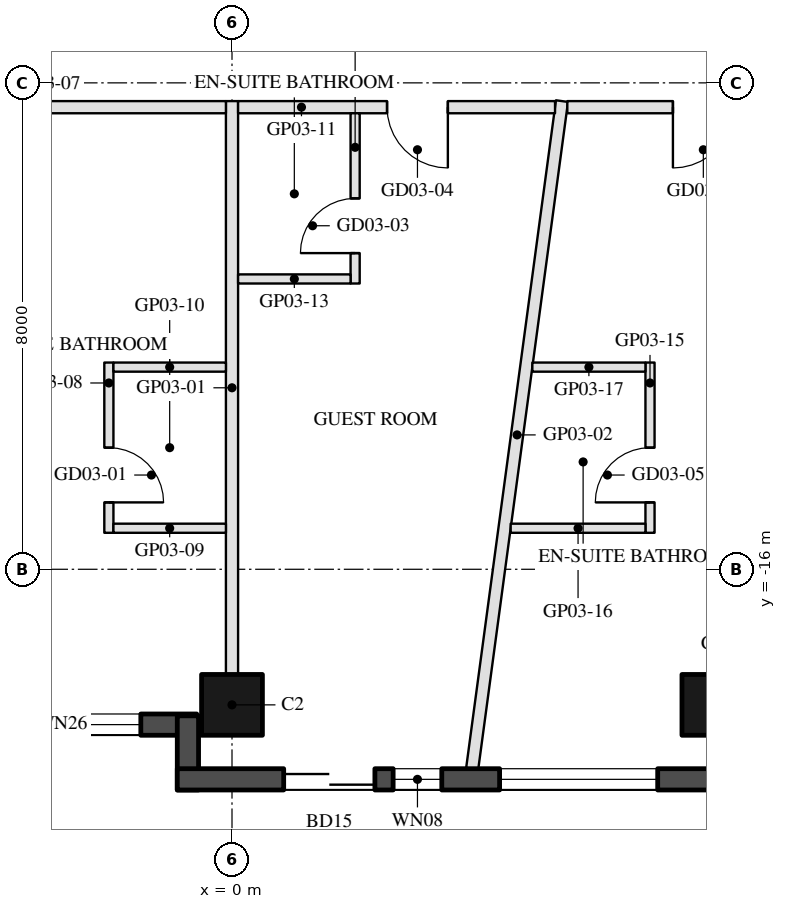
"""IFC4 building model, lengths in metres.
Left out: names, types, materials, properties, quantities, classifications, styles, units other than length and angle.
Written with IfcOpenShell. Run it as: python <this file> out.ifc"""

import sys

from ifc_helpers import new_model, si_unit, direction, frame, frame_2d, origin, origin_2d, place, context, subcontext, project, spatial, rectangle, hollow_rectangle, extrude, element, fill, save


model = new_model("IFC4")
c1 = context("Model", 3, precision=1e-05, world=origin(), true_north=direction((0.0, 1.0)))
c2 = subcontext(c1, "Body", "Model", "MODEL_VIEW")
j1 = project(units=[si_unit("LENGTHUNIT", "METRE"), si_unit("PLANEANGLEUNIT", "RADIAN")], contexts=[c1])
p1 = place(None, origin())
s1 = spatial("IfcSite", under=j1, at=p1, CompositionType="ELEMENT")
p2 = place(p1, origin())
s2 = spatial("IfcBuilding", under=s1, at=p2, CompositionType="ELEMENT")
p3 = place(p2, frame((0.0, 0.0, 61.3)))
s3 = spatial("IfcBuildingStorey", under=s2, at=p3, CompositionType="ELEMENT", Elevation=61.3)
for number, where, z_axis, x_axis in (
    (1, (0.0, -18.23, 0.0), (0.0, 0.0, 1.0), (-1.0, 0.0, 0.0)),
    (2, (7.9, -18.23, 0.0), (0.0, 0.0, 1.0), (-1.0, 0.0, 0.0)),
):
    element("IfcColumn", number, at=place(p3, frame(where, z_axis=z_axis, x_axis=x_axis)), inside=s3, PredefinedType="COLUMN", context=c2, shape_type="SweptSolid", body=[
        extrude(hollow_rectangle(XDim=1.0, YDim=1.0, WallThickness=0.045, at=origin_2d()), origin(), (0.0, 0.0, 1.0), 3.7),
    ])
p4 = place(p3, frame((-7.32, -18.555, 0.0), z_axis=(0.0, 0.0, 1.0), x_axis=(1.0, 0.0, 0.0)))
e3 = element("IfcWall", 3, at=p4, inside=s3, PredefinedType="SOLIDWALL", context=c2, shape_type="SweptSolid", body=[
    extrude(rectangle(XDim=6.74, YDim=0.35, at=frame_2d((3.37, 0.0))), origin(), (0.0, 0.0, 1.0), 3.55),
])
p5 = place(p4, frame((0.32, 0.0, 0.3)))
e4 = element("IfcOpeningElement", 4, at=p5, cuts=e3, PredefinedType="OPENING", context=c2, shape_type="SweptSolid", body=[
    extrude(rectangle(XDim=2.6, YDim=2.65, at=frame_2d((1.3, 1.325))), frame((0.0, 0.185, 0.0), z_axis=(0.0, -1.0, 0.0), x_axis=(1.0, 0.0, 0.0)), (0.0, 0.0, 1.0), 0.37),
])
p6 = place(p4, frame((3.22, 0.0, 0.3)))
e5 = element("IfcOpeningElement", 5, at=p6, cuts=e3, PredefinedType="OPENING", context=c2, shape_type="SweptSolid", body=[
    extrude(rectangle(XDim=2.6, YDim=2.65, at=frame_2d((1.3, 1.325))), frame((0.0, 0.185, 0.0), z_axis=(0.0, -1.0, 0.0), x_axis=(1.0, 0.0, 0.0)), (0.0, 0.0, 1.0), 0.37),
])
p7 = place(p3, frame((-0.725, -18.41, 0.0), z_axis=(0.0, 0.0, 1.0), x_axis=(0.0, -1.0, 0.0)))
e6 = element("IfcWall", 6, at=p7, inside=s3, PredefinedType="SOLIDWALL", context=c2, shape_type="SweptSolid", body=[
    extrude(rectangle(XDim=1.22, YDim=0.35, at=frame_2d((0.61, 0.0))), origin(), (0.0, 0.0, 1.0), 3.55),
])
p8 = place(p3, frame((-0.9, -19.455, 0.0), z_axis=(0.0, 0.0, 1.0), x_axis=(1.0, 0.0, 0.0)))
e7 = element("IfcWall", 7, at=p8, inside=s3, PredefinedType="SOLIDWALL", context=c2, shape_type="SweptSolid", body=[
    extrude(rectangle(XDim=9.7, YDim=0.35, at=frame_2d((4.85, 0.0))), origin(), (0.0, 0.0, 1.0), 3.55),
])
p9 = place(p8, frame((1.75, 0.0, 0.0)))
e8 = element("IfcOpeningElement", 8, at=p9, cuts=e7, PredefinedType="OPENING", context=c2, shape_type="SweptSolid", body=[
    extrude(rectangle(XDim=1.5, YDim=2.4, at=frame_2d((0.75, 1.2))), frame((0.0, 0.185, 0.0), z_axis=(0.0, -1.0, 0.0), x_axis=(1.0, 0.0, 0.0)), (0.0, 0.0, 1.0), 0.37),
])
p10 = place(p8, frame((3.55, 0.0, 0.3)))
e9 = element("IfcOpeningElement", 9, at=p10, cuts=e7, PredefinedType="OPENING", context=c2, shape_type="SweptSolid", body=[
    extrude(rectangle(XDim=0.8, YDim=2.65, at=frame_2d((0.4, 1.325))), frame((0.0, 0.185, 0.0), z_axis=(0.0, -1.0, 0.0), x_axis=(1.0, 0.0, 0.0)), (0.0, 0.0, 1.0), 0.37),
])
p11 = place(p8, frame((5.301, 0.0, 0.3)))
e10 = element("IfcOpeningElement", 10, at=p11, cuts=e7, PredefinedType="OPENING", context=c2, shape_type="SweptSolid", body=[
    extrude(rectangle(XDim=2.6, YDim=2.65, at=frame_2d((1.3, 1.325))), frame((0.0, 0.185, 0.0), z_axis=(0.0, -1.0, 0.0), x_axis=(1.0, 0.0, 0.0)), (0.0, 0.0, 1.0), 0.37),
])
p12 = place(p3, frame((0.0, -17.73, 0.0), z_axis=(0.0, 0.0, 1.0), x_axis=(0.0, 1.0, 0.0)))
e11 = element("IfcWall", 11, at=p12, inside=s3, PredefinedType="PARTITIONING", context=c2, shape_type="SweptSolid", body=[
    extrude(rectangle(XDim=9.43, YDim=0.2, at=frame_2d((4.715, 0.0))), origin(), (0.0, 0.0, 1.0), 2.95),
])
p13 = place(p3, frame((3.95, -19.28, 0.0), z_axis=(0.0, 0.0, 1.0), x_axis=(0.133321271807, 0.991072872439, 0.0)))
e12 = element("IfcWall", 12, at=p13, inside=s3, PredefinedType="PARTITIONING", context=c2, shape_type="SweptSolid", body=[
    extrude(rectangle(XDim=11.079, YDim=0.2, at=frame_2d((5.54, 0.0))), origin(), (0.0, 0.0, 1.0), 2.95),
])
p14 = place(p3, frame((-0.1, -8.4, 0.0), z_axis=(0.0, 0.0, 1.0), x_axis=(-1.0, 0.0, 0.0)))
e13 = element("IfcWall", 13, at=p14, inside=s3, PredefinedType="PARTITIONING", context=c2, shape_type="SweptSolid", body=[
    extrude(rectangle(XDim=9.888, YDim=0.2, at=frame_2d((4.944, 0.0))), origin(), (0.0, 0.0, 1.0), 2.95),
])
p15 = place(p14, frame((4.444, 0.0, 0.0)))
e14 = element("IfcOpeningElement", 14, at=p15, cuts=e13, PredefinedType="OPENING", context=c2, shape_type="SweptSolid", body=[
    extrude(rectangle(XDim=1.0, YDim=2.1, at=frame_2d((0.5, 1.05))), frame((0.0, 0.11, 0.0), z_axis=(0.0, -1.0, 0.0), x_axis=(1.0, 0.0, 0.0)), (0.0, 0.0, 1.0), 0.22),
])
p16 = place(p3, frame((-2.025, -12.6, 0.0), z_axis=(0.0, 0.0, 1.0), x_axis=(0.0, -1.0, 0.0)))
e15 = element("IfcWall", 15, at=p16, inside=s3, PredefinedType="PARTITIONING", context=c2, shape_type="SweptSolid", body=[
    extrude(rectangle(XDim=2.8, YDim=0.15, at=frame_2d((1.4, 0.0))), origin(), (0.0, 0.0, 1.0), 3.55),
])
p17 = place(p16, frame((1.4, 0.0, 0.0)))
e16 = element("IfcOpeningElement", 16, at=p17, cuts=e15, PredefinedType="OPENING", context=c2, shape_type="SweptSolid", body=[
    extrude(rectangle(XDim=0.9, YDim=2.1, at=frame_2d((0.45, 1.05))), frame((0.0, 0.085, 0.0), z_axis=(0.0, -1.0, 0.0), x_axis=(1.0, 0.0, 0.0)), (0.0, 0.0, 1.0), 0.17),
])
for number, where, z_axis, x_axis in (
    (17, (-1.95, -15.325, 0.0), (0.0, 0.0, 1.0), (1.0, 0.0, 0.0)),
    (18, (-1.95, -12.675, 0.0), (0.0, 0.0, 1.0), (1.0, 0.0, 0.0)),
):
    element("IfcWall", number, at=place(p3, frame(where, z_axis=z_axis, x_axis=x_axis)), inside=s3, PredefinedType="PARTITIONING", context=c2, shape_type="SweptSolid", body=[
        extrude(rectangle(XDim=1.85, YDim=0.15, at=frame_2d((0.925, 0.0))), origin(), (0.0, 0.0, 1.0), 2.95),
    ])
p18 = place(p3, frame((5.312, -8.4, 0.0), z_axis=(0.0, 0.0, 1.0), x_axis=(-1.0, 0.0, 0.0)))
e19 = element("IfcWall", 19, at=p18, inside=s3, PredefinedType="PARTITIONING", context=c2, shape_type="SweptSolid", body=[
    extrude(rectangle(XDim=5.212, YDim=0.2, at=frame_2d((2.606, 0.0))), origin(), (0.0, 0.0, 1.0), 2.95),
])
p19 = place(p18, frame((1.763, 0.0, 0.0)))
e20 = element("IfcOpeningElement", 20, at=p19, cuts=e19, PredefinedType="OPENING", context=c2, shape_type="SweptSolid", body=[
    extrude(rectangle(XDim=1.0, YDim=2.1, at=frame_2d((0.5, 1.05))), frame((0.0, 0.11, 0.0), z_axis=(0.0, -1.0, 0.0), x_axis=(1.0, 0.0, 0.0)), (0.0, 0.0, 1.0), 0.22),
])
p20 = place(p3, frame((2.025, -11.3, 0.0), z_axis=(0.0, 0.0, 1.0), x_axis=(0.0, 1.0, 0.0)))
e21 = element("IfcWall", 21, at=p20, inside=s3, PredefinedType="PARTITIONING", context=c2, shape_type="SweptSolid", body=[
    extrude(rectangle(XDim=2.8, YDim=0.15, at=frame_2d((1.4, 0.0))), origin(), (0.0, 0.0, 1.0), 3.55),
])
p21 = place(p20, frame((0.5, 0.0, 0.0)))
e22 = element("IfcOpeningElement", 22, at=p21, cuts=e21, PredefinedType="OPENING", context=c2, shape_type="SweptSolid", body=[
    extrude(rectangle(XDim=0.9, YDim=2.1, at=frame_2d((0.45, 1.05))), frame((0.0, 0.085, 0.0), z_axis=(0.0, -1.0, 0.0), x_axis=(1.0, 0.0, 0.0)), (0.0, 0.0, 1.0), 0.17),
])
p22 = place(p3, frame((0.1, -11.225, 0.0), z_axis=(0.0, 0.0, 1.0), x_axis=(1.0, 0.0, 0.0)))
e23 = element("IfcWall", 23, at=p22, inside=s3, PredefinedType="PARTITIONING", context=c2, shape_type="SweptSolid", body=[
    extrude(rectangle(XDim=1.85, YDim=0.15, at=frame_2d((0.925, 0.0))), origin(), (0.0, 0.0, 1.0), 2.95),
])
p23 = place(p3, frame((9.988, -8.4, 0.0), z_axis=(0.0, 0.0, 1.0), x_axis=(-1.0, 0.0, 0.0)))
e24 = element("IfcWall", 24, at=p23, inside=s3, PredefinedType="PARTITIONING", context=c2, shape_type="SweptSolid", body=[
    extrude(rectangle(XDim=4.474, YDim=0.2, at=frame_2d((2.237, 0.0))), origin(), (0.0, 0.0, 1.0), 2.95),
])
p24 = place(p23, frame((1.737, 0.0, 0.0)))
e25 = element("IfcOpeningElement", 25, at=p24, cuts=e24, PredefinedType="OPENING", context=c2, shape_type="SweptSolid", body=[
    extrude(rectangle(XDim=1.0, YDim=2.1, at=frame_2d((0.5, 1.05))), frame((0.0, 0.11, 0.0), z_axis=(0.0, -1.0, 0.0), x_axis=(1.0, 0.0, 0.0)), (0.0, 0.0, 1.0), 0.22),
])
p25 = place(p3, frame((6.875, -15.4, 0.0), z_axis=(0.0, 0.0, 1.0), x_axis=(0.0, 1.0, 0.0)))
e26 = element("IfcWall", 26, at=p25, inside=s3, PredefinedType="PARTITIONING", context=c2, shape_type="SweptSolid", body=[
    extrude(rectangle(XDim=2.8, YDim=0.15, at=frame_2d((1.4, 0.0))), origin(), (0.0, 0.0, 1.0), 3.55),
])
p26 = place(p25, frame((0.5, 0.0, 0.0)))
e27 = element("IfcOpeningElement", 27, at=p26, cuts=e26, PredefinedType="OPENING", context=c2, shape_type="SweptSolid", body=[
    extrude(rectangle(XDim=0.9, YDim=2.1, at=frame_2d((0.45, 1.05))), frame((0.0, 0.085, 0.0), z_axis=(0.0, -1.0, 0.0), x_axis=(1.0, 0.0, 0.0)), (0.0, 0.0, 1.0), 0.17),
])
p27 = place(p3, frame((4.583, -15.325, 0.0), z_axis=(0.0, 0.0, 1.0), x_axis=(1.0, 0.0, 0.0)))
e28 = element("IfcWall", 28, at=p27, inside=s3, PredefinedType="PARTITIONING", context=c2, shape_type="SweptSolid", body=[
    extrude(rectangle(XDim=2.216, YDim=0.15, at=frame_2d((1.108, 0.0))), origin(), (0.0, 0.0, 1.0), 3.55),
])
p28 = place(p3, frame((4.939, -12.675, 0.0), z_axis=(0.0, 0.0, 1.0), x_axis=(1.0, 0.0, 0.0)))
e29 = element("IfcWall", 29, at=p28, inside=s3, PredefinedType="PARTITIONING", context=c2, shape_type="SweptSolid", body=[
    extrude(rectangle(XDim=1.86, YDim=0.15, at=frame_2d((0.93, 0.0))), origin(), (0.0, 0.0, 1.0), 3.55),
])
p29 = place(p6, origin())
e30 = element("IfcWindow", 30, at=p29, inside=s3, PartitioningType="SINGLE_PANEL", PredefinedType="WINDOW", context=c2, shape_type="SweptSolid", body=[
    extrude(rectangle(XDim=2.6, YDim=2.65, at=frame_2d((1.3, 1.325))), frame((0.0, 0.03, 0.0), z_axis=(0.0, -1.0, 0.0), x_axis=(1.0, 0.0, 0.0)), (0.0, 0.0, 1.0), 0.06),
])
fill(e5, e30)
p30 = place(p9, frame((1.5, 0.0, 0.0), z_axis=(0.0, 0.0, 1.0), x_axis=(-1.0, 0.0, 0.0)))
e31 = element("IfcDoor", 31, at=p30, inside=s3, OperationType="SLIDING_TO_LEFT", PredefinedType="DOOR", context=c2, shape_type="SweptSolid", body=[
    extrude(rectangle(XDim=1.5, YDim=2.4, at=frame_2d((0.75, 1.2))), frame((0.0, 0.025, 0.0), z_axis=(0.0, -1.0, 0.0), x_axis=(1.0, 0.0, 0.0)), (0.0, 0.0, 1.0), 0.05),
])
fill(e8, e31)
p31 = place(p10, origin())
e32 = element("IfcWindow", 32, at=p31, inside=s3, PartitioningType="SINGLE_PANEL", PredefinedType="WINDOW", context=c2, shape_type="SweptSolid", body=[
    extrude(rectangle(XDim=0.8, YDim=2.65, at=frame_2d((0.4, 1.325))), frame((0.0, 0.03, 0.0), z_axis=(0.0, -1.0, 0.0), x_axis=(1.0, 0.0, 0.0)), (0.0, 0.0, 1.0), 0.06),
])
fill(e9, e32)
p32 = place(p11, origin())
e33 = element("IfcWindow", 33, at=p32, inside=s3, PartitioningType="SINGLE_PANEL", PredefinedType="WINDOW", context=c2, shape_type="SweptSolid", body=[
    extrude(rectangle(XDim=2.6, YDim=2.65, at=frame_2d((1.3, 1.325))), frame((0.0, 0.03, 0.0), z_axis=(0.0, -1.0, 0.0), x_axis=(1.0, 0.0, 0.0)), (0.0, 0.0, 1.0), 0.06),
])
fill(e10, e33)
p33 = place(p17, origin())
e34 = element("IfcDoor", 34, at=p33, inside=s3, OperationType="SINGLE_SWING_RIGHT", PredefinedType="DOOR", context=c2, shape_type="SweptSolid", body=[
    extrude(rectangle(XDim=0.9, YDim=2.1, at=frame_2d((0.45, 1.05))), frame((0.0, 0.025, 0.0), z_axis=(0.0, -1.0, 0.0), x_axis=(1.0, 0.0, 0.0)), (0.0, 0.0, 1.0), 0.05),
])
fill(e16, e34)
p34 = place(p21, origin())
e35 = element("IfcDoor", 35, at=p34, inside=s3, OperationType="SINGLE_SWING_LEFT", PredefinedType="DOOR", context=c2, shape_type="SweptSolid", body=[
    extrude(rectangle(XDim=0.9, YDim=2.1, at=frame_2d((0.45, 1.05))), frame((0.0, 0.025, 0.0), z_axis=(0.0, -1.0, 0.0), x_axis=(1.0, 0.0, 0.0)), (0.0, 0.0, 1.0), 0.05),
])
fill(e22, e35)
p35 = place(p19, origin())
e36 = element("IfcDoor", 36, at=p35, inside=s3, OperationType="SINGLE_SWING_LEFT", PredefinedType="DOOR", context=c2, shape_type="SweptSolid", body=[
    extrude(rectangle(XDim=1.0, YDim=2.1, at=frame_2d((0.5, 1.05))), frame((0.0, 0.025, 0.0), z_axis=(0.0, -1.0, 0.0), x_axis=(1.0, 0.0, 0.0)), (0.0, 0.0, 1.0), 0.05),
])
fill(e20, e36)
p36 = place(p26, origin())
e37 = element("IfcDoor", 37, at=p36, inside=s3, OperationType="SINGLE_SWING_LEFT", PredefinedType="DOOR", context=c2, shape_type="SweptSolid", body=[
    extrude(rectangle(XDim=0.9, YDim=2.1, at=frame_2d((0.45, 1.05))), frame((0.0, 0.025, 0.0), z_axis=(0.0, -1.0, 0.0), x_axis=(1.0, 0.0, 0.0)), (0.0, 0.0, 1.0), 0.05),
])
fill(e27, e37)
p37 = place(p24, origin())
e38 = element("IfcDoor", 38, at=p37, inside=s3, OperationType="SINGLE_SWING_RIGHT", PredefinedType="DOOR", context=c2, shape_type="SweptSolid", body=[
    extrude(rectangle(XDim=1.0, YDim=2.1, at=frame_2d((0.5, 1.05))), frame((0.0, 0.025, 0.0), z_axis=(0.0, -1.0, 0.0), x_axis=(1.0, 0.0, 0.0)), (0.0, 0.0, 1.0), 0.05),
])
fill(e25, e38)
save(model, sys.argv[1])
